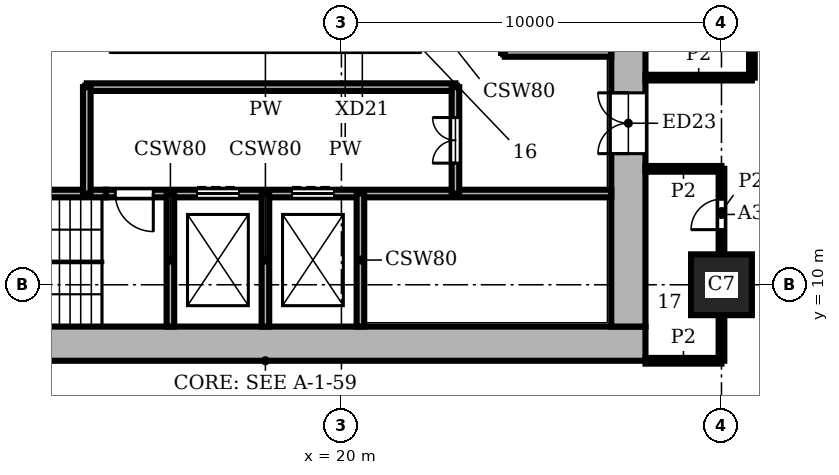
"""IFC4 building model, lengths in metres.
Left out: names, types, materials, properties, quantities, classifications, styles, units other than length and angle.
Written with IfcOpenShell. Run it as: python <this file> out.ifc"""

import sys

from ifc_helpers import new_model, si_unit, direction, frame, frame_2d, origin, origin_2d, place, context, subcontext, project, spatial, rectangle, extrude, element, fill, save


model = new_model("IFC4")
c1 = context("Model", 3, precision=1e-05, world=origin(), true_north=direction((0.0, 1.0)))
c2 = subcontext(c1, "Body", "Model", "MODEL_VIEW")
j1 = project(units=[si_unit("LENGTHUNIT", "METRE"), si_unit("PLANEANGLEUNIT", "RADIAN")], contexts=[c1])
p1 = place(None, origin())
s1 = spatial("IfcSite", under=j1, at=p1, CompositionType="ELEMENT")
p2 = place(p1, origin())
s2 = spatial("IfcBuilding", under=s1, at=p2, CompositionType="ELEMENT")
p3 = place(p2, frame((0.0, 0.0, 35.4)))
s3 = spatial("IfcBuildingStorey", under=s2, at=p3, CompositionType="ELEMENT", Elevation=35.4)
p4 = place(p3, frame((30.0, 10.0, 0.0), z_axis=(0.0, 0.0, 1.0), x_axis=(1.0, 0.0, 0.0)))
e1 = element("IfcColumn", 1, at=p4, inside=s3, PredefinedType="COLUMN", context=c2, shape_type="SweptSolid", body=[
    extrude(rectangle(XDim=1.6, YDim=1.6, at=origin_2d()), origin(), (0.0, 0.0, 1.0), 3.9),
])
p5 = place(p3, frame((8.0, 8.45, 0.0), z_axis=(0.0, 0.0, 1.0), x_axis=(1.0, 0.0, 0.0)))
e2 = element("IfcWall", 2, at=p5, inside=s3, PredefinedType="SHEAR", context=c2, shape_type="SweptSolid", body=[
    extrude(rectangle(XDim=20.0, YDim=0.9, at=frame_2d((10.0, 0.0))), origin(), (0.0, 0.0, 1.0), 3.9),
])
p6 = place(p3, frame((27.55, 8.9, 0.0), z_axis=(0.0, 0.0, 1.0), x_axis=(0.0, 1.0, 0.0)))
e3 = element("IfcWall", 3, at=p6, inside=s3, PredefinedType="SHEAR", context=c2, shape_type="SweptSolid", body=[
    extrude(rectangle(XDim=18.2, YDim=0.9, at=frame_2d((9.1, 0.0))), origin(), (0.0, 0.0, 1.0), 3.9),
])
p7 = place(p6, frame((4.55, 0.0, 0.0)))
e4 = element("IfcOpeningElement", 4, at=p7, cuts=e3, PredefinedType="OPENING", context=c2, shape_type="SweptSolid", body=[
    extrude(rectangle(XDim=1.6, YDim=2.1, at=frame_2d((0.8, 1.05))), frame((0.0, 0.46, 0.0), z_axis=(0.0, -1.0, 0.0), x_axis=(1.0, 0.0, 0.0)), (0.0, 0.0, 1.0), 0.92),
])
p8 = place(p3, frame((8.9, 12.4, 0.0), z_axis=(0.0, 0.0, 1.0), x_axis=(1.0, 0.0, 0.0)))
e5 = element("IfcWall", 5, at=p8, inside=s3, PredefinedType="SHEAR", context=c2, shape_type="SweptSolid", body=[
    extrude(rectangle(XDim=4.9, YDim=0.2, at=frame_2d((2.45, 0.0))), origin(), (0.0, 0.0, 1.0), 3.58),
])
p9 = place(p3, frame((13.8, 12.4, 0.0), z_axis=(0.0, 0.0, 1.0), x_axis=(1.0, 0.0, 0.0)))
e6 = element("IfcWall", 6, at=p9, inside=s3, PredefinedType="SHEAR", context=c2, shape_type="SweptSolid", body=[
    extrude(rectangle(XDim=13.3, YDim=0.2, at=frame_2d((6.65, 0.0))), origin(), (0.0, 0.0, 1.0), 3.58),
])
p10 = place(p9, frame((2.4, 0.0, 0.0)))
e7 = element("IfcOpeningElement", 7, at=p10, cuts=e6, PredefinedType="OPENING", context=c2, shape_type="SweptSolid", body=[
    extrude(rectangle(XDim=1.1, YDim=2.1, at=frame_2d((0.55, 1.05))), frame((0.0, 0.11, 0.0), z_axis=(0.0, -1.0, 0.0), x_axis=(1.0, 0.0, 0.0)), (0.0, 0.0, 1.0), 0.22),
])
p11 = place(p9, frame((4.9, 0.0, 0.0)))
e8 = element("IfcOpeningElement", 8, at=p11, cuts=e6, PredefinedType="OPENING", context=c2, shape_type="SweptSolid", body=[
    extrude(rectangle(XDim=1.1, YDim=2.1, at=frame_2d((0.55, 1.05))), frame((0.0, 0.11, 0.0), z_axis=(0.0, -1.0, 0.0), x_axis=(1.0, 0.0, 0.0)), (0.0, 0.0, 1.0), 0.22),
])
p12 = place(p9, frame((0.25, 0.0, 0.0)))
e9 = element("IfcOpeningElement", 9, at=p12, cuts=e6, PredefinedType="OPENING", context=c2, shape_type="SweptSolid", body=[
    extrude(rectangle(XDim=1.0, YDim=2.1, at=frame_2d((0.5, 1.05))), frame((0.0, 0.11, 0.0), z_axis=(0.0, -1.0, 0.0), x_axis=(1.0, 0.0, 0.0)), (0.0, 0.0, 1.0), 0.22),
])
p13 = place(p3, frame((13.3, 15.2, 0.0), z_axis=(0.0, 0.0, 1.0), x_axis=(1.0, 0.0, 0.0)))
e10 = element("IfcWall", 10, at=p13, inside=s3, PredefinedType="SHEAR", context=c2, shape_type="SweptSolid", body=[
    extrude(rectangle(XDim=9.7, YDim=0.2, at=frame_2d((4.85, 0.0))), origin(), (0.0, 0.0, 1.0), 3.58),
])
for number, where, z_axis, x_axis in (
    (11, (24.3, 16.1, 0.0), (0.0, 0.0, 1.0), (1.0, 0.0, 0.0)),
    (12, (13.3, 12.4, 0.0), (0.0, 0.0, 1.0), (0.0, 1.0, 0.0)),
):
    element("IfcWall", number, at=place(p3, frame(where, z_axis=z_axis, x_axis=x_axis)), inside=s3, PredefinedType="SHEAR", context=c2, shape_type="SweptSolid", body=[
        extrude(rectangle(XDim=2.8, YDim=0.2, at=frame_2d((1.4, 0.0))), origin(), (0.0, 0.0, 1.0), 3.58),
    ])
for number, where, z_axis, x_axis in (
    (13, (15.5, 8.9, 0.0), (0.0, 0.0, 1.0), (0.0, 1.0, 0.0)),
    (14, (18.0, 8.9, 0.0), (0.0, 0.0, 1.0), (0.0, 1.0, 0.0)),
    (15, (20.5, 8.9, 0.0), (0.0, 0.0, 1.0), (0.0, 1.0, 0.0)),
):
    element("IfcWall", number, at=place(p3, frame(where, z_axis=z_axis, x_axis=x_axis)), inside=s3, PredefinedType="SHEAR", context=c2, shape_type="SweptSolid", body=[
        extrude(rectangle(XDim=3.5, YDim=0.2, at=frame_2d((1.75, 0.0))), origin(), (0.0, 0.0, 1.0), 3.58),
    ])
p14 = place(p3, frame((23.0, 12.4, 0.0), z_axis=(0.0, 0.0, 1.0), x_axis=(0.0, 1.0, 0.0)))
e16 = element("IfcWall", 16, at=p14, inside=s3, PredefinedType="SHEAR", context=c2, shape_type="SweptSolid", body=[
    extrude(rectangle(XDim=2.8, YDim=0.2, at=frame_2d((1.4, 0.0))), origin(), (0.0, 0.0, 1.0), 3.58),
])
p15 = place(p14, frame((0.8, 0.0, 0.0)))
e17 = element("IfcOpeningElement", 17, at=p15, cuts=e16, PredefinedType="OPENING", context=c2, shape_type="SweptSolid", body=[
    extrude(rectangle(XDim=1.2, YDim=2.1, at=frame_2d((0.6, 1.05))), frame((0.0, 0.11, 0.0), z_axis=(0.0, -1.0, 0.0), x_axis=(1.0, 0.0, 0.0)), (0.0, 0.0, 1.0), 0.22),
])
p16 = place(p3, frame((30.0, 8.0, 0.0), z_axis=(0.0, 0.0, 1.0), x_axis=(0.0, 1.0, 0.0)))
e18 = element("IfcWall", 18, at=p16, inside=s3, PredefinedType="PARTITIONING", context=c2, shape_type="SweptSolid", body=[
    extrude(rectangle(XDim=1.2, YDim=0.15, at=frame_2d((0.6, 0.0))), origin(), (0.0, 0.0, 1.0), 3.58),
])
p17 = place(p3, frame((30.0, 10.8, 0.0), z_axis=(0.0, 0.0, 1.0), x_axis=(0.0, 1.0, 0.0)))
e19 = element("IfcWall", 19, at=p17, inside=s3, PredefinedType="PARTITIONING", context=c2, shape_type="SweptSolid", body=[
    extrude(rectangle(XDim=2.25, YDim=0.15, at=frame_2d((1.125, 0.0))), origin(), (0.0, 0.0, 1.0), 3.58),
])
p18 = place(p17, frame((0.65, 0.0, 0.0)))
e20 = element("IfcOpeningElement", 20, at=p18, cuts=e19, PredefinedType="OPENING", context=c2, shape_type="SweptSolid", body=[
    extrude(rectangle(XDim=0.8, YDim=2.1, at=frame_2d((0.4, 1.05))), frame((0.0, 0.085, 0.0), z_axis=(0.0, -1.0, 0.0), x_axis=(1.0, 0.0, 0.0)), (0.0, 0.0, 1.0), 0.17),
])
p19 = place(p3, frame((30.8, 15.45, 0.0), z_axis=(0.0, 0.0, 1.0), x_axis=(0.0, 1.0, 0.0)))
e21 = element("IfcWall", 21, at=p19, inside=s3, PredefinedType="PARTITIONING", context=c2, shape_type="SweptSolid", body=[
    extrude(rectangle(XDim=3.75, YDim=0.15, at=frame_2d((1.875, 0.0))), origin(), (0.0, 0.0, 1.0), 3.58),
])
p20 = place(p19, frame((1.35, 0.0, 0.0)))
e22 = element("IfcOpeningElement", 22, at=p20, cuts=e21, PredefinedType="OPENING", context=c2, shape_type="SweptSolid", body=[
    extrude(rectangle(XDim=1.1, YDim=2.1, at=frame_2d((0.55, 1.05))), frame((0.0, 0.085, 0.0), z_axis=(0.0, -1.0, 0.0), x_axis=(1.0, 0.0, 0.0)), (0.0, 0.0, 1.0), 0.17),
])
for number, where, z_axis, x_axis in (
    (23, (28.0, 8.0, 0.0), (0.0, 0.0, 1.0), (1.0, 0.0, 0.0)),
    (24, (28.0, 13.05, 0.0), (0.0, 0.0, 1.0), (1.0, 0.0, 0.0)),
):
    element("IfcWall", number, at=place(p3, frame(where, z_axis=z_axis, x_axis=x_axis)), inside=s3, PredefinedType="PARTITIONING", context=c2, shape_type="SweptSolid", body=[
        extrude(rectangle(XDim=2.0, YDim=0.15, at=frame_2d((1.0, 0.0))), origin(), (0.0, 0.0, 1.0), 3.58),
    ])
p21 = place(p3, frame((28.0, 15.45, 0.0), z_axis=(0.0, 0.0, 1.0), x_axis=(1.0, 0.0, 0.0)))
e25 = element("IfcWall", 25, at=p21, inside=s3, PredefinedType="PARTITIONING", context=c2, shape_type="SweptSolid", body=[
    extrude(rectangle(XDim=2.8, YDim=0.15, at=frame_2d((1.4, 0.0))), origin(), (0.0, 0.0, 1.0), 3.58),
])
p22 = place(p10, origin())
e26 = element("IfcDoor", 26, at=p22, inside=s3, OperationType="DOUBLE_DOOR_SLIDING", PredefinedType="DOOR", context=c2, shape_type="SweptSolid", body=[
    extrude(rectangle(XDim=1.1, YDim=2.1, at=frame_2d((0.55, 1.05))), frame((0.0, 0.025, 0.0), z_axis=(0.0, -1.0, 0.0), x_axis=(1.0, 0.0, 0.0)), (0.0, 0.0, 1.0), 0.05),
])
fill(e7, e26)
p23 = place(p11, origin())
e27 = element("IfcDoor", 27, at=p23, inside=s3, OperationType="DOUBLE_DOOR_SLIDING", PredefinedType="DOOR", context=c2, shape_type="SweptSolid", body=[
    extrude(rectangle(XDim=1.1, YDim=2.1, at=frame_2d((0.55, 1.05))), frame((0.0, 0.025, 0.0), z_axis=(0.0, -1.0, 0.0), x_axis=(1.0, 0.0, 0.0)), (0.0, 0.0, 1.0), 0.05),
])
fill(e8, e27)
p24 = place(p12, frame((1.0, 0.0, 0.0), z_axis=(0.0, 0.0, 1.0), x_axis=(-1.0, 0.0, 0.0)))
e28 = element("IfcDoor", 28, at=p24, inside=s3, OperationType="SINGLE_SWING_LEFT", PredefinedType="DOOR", context=c2, shape_type="SweptSolid", body=[
    extrude(rectangle(XDim=1.0, YDim=2.1, at=frame_2d((0.5, 1.05))), frame((0.0, 0.025, 0.0), z_axis=(0.0, -1.0, 0.0), x_axis=(1.0, 0.0, 0.0)), (0.0, 0.0, 1.0), 0.05),
])
fill(e9, e28)
p25 = place(p15, origin())
e29 = element("IfcDoor", 29, at=p25, inside=s3, OperationType="DOUBLE_DOOR_SINGLE_SWING", PredefinedType="DOOR", context=c2, shape_type="SweptSolid", body=[
    extrude(rectangle(XDim=1.2, YDim=2.1, at=frame_2d((0.6, 1.05))), frame((0.0, 0.025, 0.0), z_axis=(0.0, -1.0, 0.0), x_axis=(1.0, 0.0, 0.0)), (0.0, 0.0, 1.0), 0.05),
])
fill(e17, e29)
p26 = place(p7, origin())
e30 = element("IfcDoor", 30, at=p26, inside=s3, OperationType="DOUBLE_DOOR_SINGLE_SWING", PredefinedType="DOOR", context=c2, shape_type="SweptSolid", body=[
    extrude(rectangle(XDim=1.6, YDim=2.1, at=frame_2d((0.8, 1.05))), frame((0.0, 0.025, 0.0), z_axis=(0.0, -1.0, 0.0), x_axis=(1.0, 0.0, 0.0)), (0.0, 0.0, 1.0), 0.05),
])
fill(e4, e30)
p27 = place(p18, origin())
e31 = element("IfcDoor", 31, at=p27, inside=s3, OperationType="SINGLE_SWING_LEFT", PredefinedType="DOOR", context=c2, shape_type="SweptSolid", body=[
    extrude(rectangle(XDim=0.8, YDim=2.1, at=frame_2d((0.4, 1.05))), frame((0.0, 0.025, 0.0), z_axis=(0.0, -1.0, 0.0), x_axis=(1.0, 0.0, 0.0)), (0.0, 0.0, 1.0), 0.05),
])
fill(e20, e31)
save(model, sys.argv[1])
